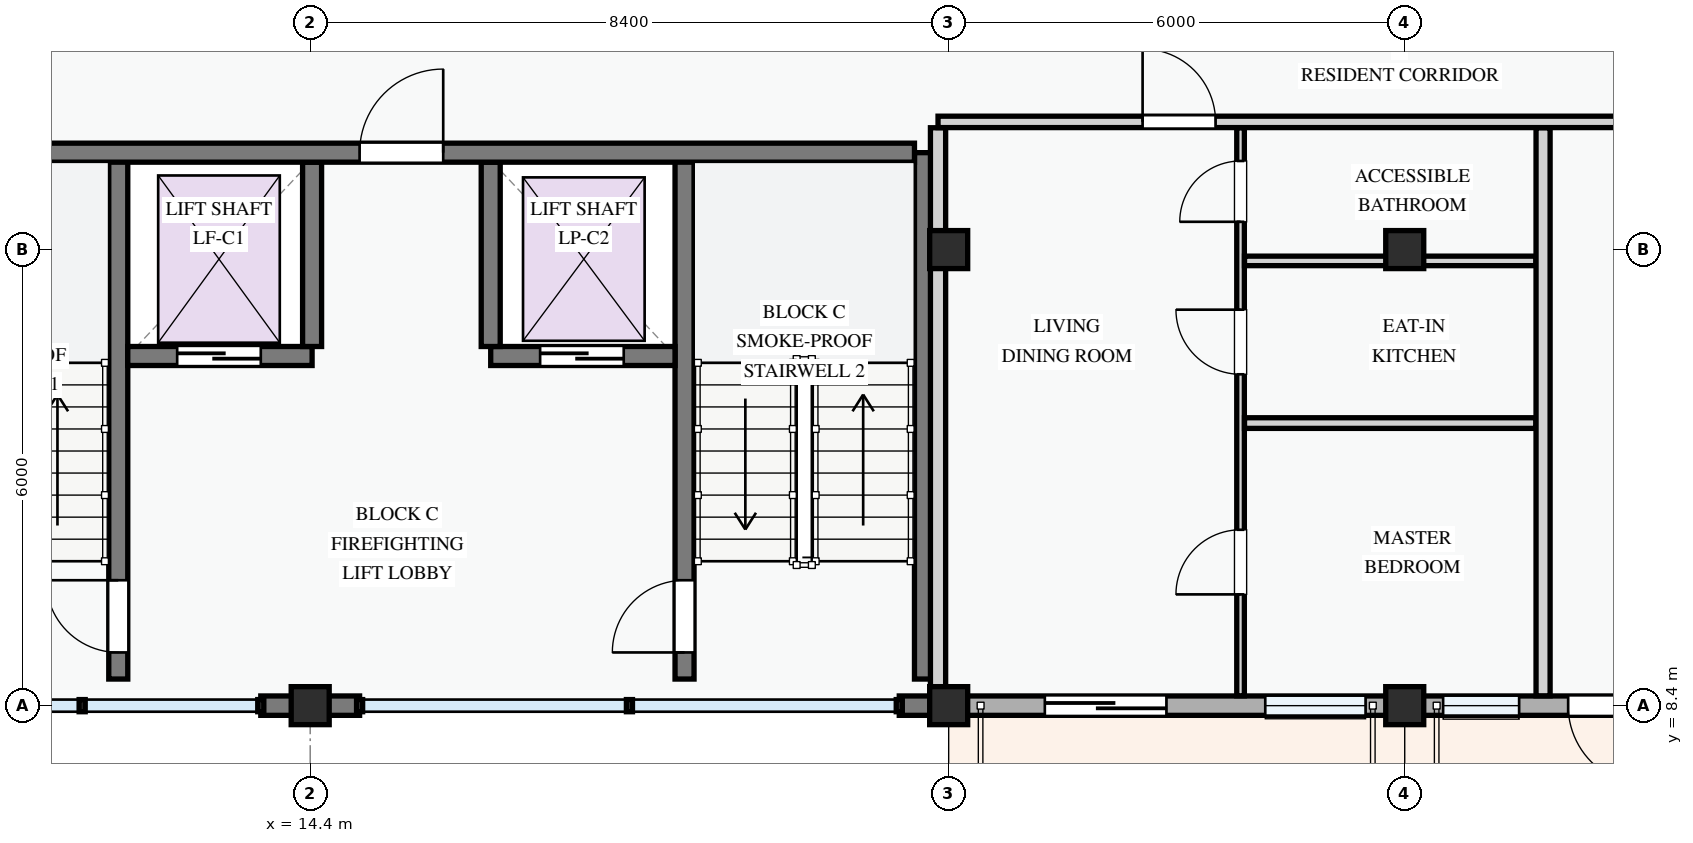
"""IFC4 building model, lengths in metres.
Left out: names, types, materials, properties, quantities, classifications, styles, units other than length and angle.
Written with IfcOpenShell. Run it as: python <this file> out.ifc"""

import sys

from ifc_helpers import new_model, si_unit, direction, frame, frame_2d, origin, origin_2d, place, context, subcontext, project, spatial, rectangle, extrude, element, fill, save


model = new_model("IFC4")
c1 = context("Model", 3, precision=1e-05, world=origin(), true_north=direction((0.0, 1.0)))
c2 = subcontext(c1, "Body", "Model", "MODEL_VIEW")
j1 = project(units=[si_unit("LENGTHUNIT", "METRE"), si_unit("PLANEANGLEUNIT", "RADIAN")], contexts=[c1])
p1 = place(None, origin())
s1 = spatial("IfcSite", under=j1, at=p1, CompositionType="ELEMENT")
p2 = place(p1, origin())
s2 = spatial("IfcBuilding", under=s1, at=p2, CompositionType="ELEMENT")
p3 = place(p2, frame((0.0, 0.0, 31.2)))
s3 = spatial("IfcBuildingStorey", under=s2, at=p3, CompositionType="ELEMENT", Elevation=31.2)
for number, where, z_axis, x_axis in (
    (1, (14.4, 8.4, 0.0), (0.0, 0.0, 1.0), (1.0, 0.0, 0.0)),
    (2, (22.8, 8.4, 0.0), (0.0, 0.0, 1.0), (1.0, 0.0, 0.0)),
    (3, (22.8, 14.4, 0.0), (0.0, 0.0, 1.0), (1.0, 0.0, 0.0)),
    (4, (28.8, 8.4, 0.0), (0.0, 0.0, 1.0), (1.0, 0.0, 0.0)),
    (5, (28.8, 14.4, 0.0), (0.0, 0.0, 1.0), (1.0, 0.0, 0.0)),
):
    element("IfcColumn", number, at=place(p3, frame(where, z_axis=z_axis, x_axis=x_axis)), inside=s3, PredefinedType="COLUMN", context=c2, shape_type="SweptSolid", body=[
        extrude(rectangle(XDim=0.5, YDim=0.5, at=origin_2d()), origin(), (0.0, 0.0, 1.0), 3.3),
    ])
p4 = place(p3, frame((13.75, 8.4, 0.0), z_axis=(0.0, 0.0, 1.0), x_axis=(1.0, 0.0, 0.0)))
e6 = element("IfcWall", 6, at=p4, inside=s3, PredefinedType="STANDARD", context=c2, shape_type="SweptSolid", body=[
    extrude(rectangle(XDim=0.65, YDim=0.255, at=frame_2d((0.325, 0.0))), origin(), (0.0, 0.0, 1.0), 3.04),
])
for number, where, z_axis, x_axis in (
    (7, (14.4, 8.4, 0.0), (0.0, 0.0, 1.0), (1.0, 0.0, 0.0)),
    (8, (22.15, 8.4, 0.0), (0.0, 0.0, 1.0), (1.0, 0.0, 0.0)),
):
    element("IfcWall", number, at=place(p3, frame(where, z_axis=z_axis, x_axis=x_axis)), inside=s3, PredefinedType="STANDARD", context=c2, shape_type="SweptSolid", body=[
        extrude(rectangle(XDim=0.65, YDim=0.255, at=frame_2d((0.325, 0.0))), origin(), (0.0, 0.0, 1.0), 3.04),
    ])
p5 = place(p3, frame((22.8, 8.4, 0.0), z_axis=(0.0, 0.0, 1.0), x_axis=(1.0, 0.0, 0.0)))
e9 = element("IfcWall", 9, at=p5, inside=s3, PredefinedType="STANDARD", context=c2, shape_type="SweptSolid", body=[
    extrude(rectangle(XDim=6.0, YDim=0.255, at=frame_2d((3.0, 0.0))), origin(), (0.0, 0.0, 1.0), 2.525),
])
p6 = place(p5, frame((1.265, 0.0, 0.0)))
e10 = element("IfcOpeningElement", 10, at=p6, cuts=e9, PredefinedType="OPENING", context=c2, shape_type="SweptSolid", body=[
    extrude(rectangle(XDim=1.6, YDim=2.2, at=frame_2d((0.8, 1.1))), frame((0.0, 0.137, 0.0), z_axis=(0.0, -1.0, 0.0), x_axis=(1.0, 0.0, 0.0)), (0.0, 0.0, 1.0), 0.275),
])
p7 = place(p5, frame((4.165, 0.0, 0.78)))
e11 = element("IfcOpeningElement", 11, at=p7, cuts=e9, PredefinedType="OPENING", context=c2, shape_type="SweptSolid", body=[
    extrude(rectangle(XDim=1.32, YDim=1.35, at=frame_2d((0.66, 0.675))), frame((0.0, 0.137, 0.0), z_axis=(0.0, -1.0, 0.0), x_axis=(1.0, 0.0, 0.0)), (0.0, 0.0, 1.0), 0.275),
])
p8 = place(p3, frame((28.8, 8.4, 0.0), z_axis=(0.0, 0.0, 1.0), x_axis=(1.0, 0.0, 0.0)))
e12 = element("IfcWall", 12, at=p8, inside=s3, PredefinedType="STANDARD", context=c2, shape_type="SweptSolid", body=[
    extrude(rectangle(XDim=8.4, YDim=0.255, at=frame_2d((4.2, 0.0))), origin(), (0.0, 0.0, 1.0), 2.375),
])
p9 = place(p8, frame((2.15, 0.0, 0.0)))
e13 = element("IfcOpeningElement", 13, at=p9, cuts=e12, PredefinedType="OPENING", context=c2, shape_type="SweptSolid", body=[
    extrude(rectangle(XDim=1.05, YDim=2.15, at=frame_2d((0.525, 1.075))), frame((0.0, 0.137, 0.0), z_axis=(0.0, -1.0, 0.0), x_axis=(1.0, 0.0, 0.0)), (0.0, 0.0, 1.0), 0.275),
])
p10 = place(p8, frame((0.505, 0.0, 0.78)))
e14 = element("IfcOpeningElement", 14, at=p10, cuts=e12, PredefinedType="OPENING", context=c2, shape_type="SweptSolid", body=[
    extrude(rectangle(XDim=1.0, YDim=1.25, at=frame_2d((0.5, 0.625))), frame((0.0, 0.137, 0.0), z_axis=(0.0, -1.0, 0.0), x_axis=(1.0, 0.0, 0.0)), (0.0, 0.0, 1.0), 0.275),
])
p11 = place(p8, frame((4.265, 0.0, 0.78)))
e15 = element("IfcOpeningElement", 15, at=p11, cuts=e12, PredefinedType="OPENING", context=c2, shape_type="SweptSolid", body=[
    extrude(rectangle(XDim=1.4, YDim=1.45, at=frame_2d((0.7, 0.725))), frame((0.0, 0.137, 0.0), z_axis=(0.0, -1.0, 0.0), x_axis=(1.0, 0.0, 0.0)), (0.0, 0.0, 1.0), 0.275),
])
p12 = place(p8, frame((6.97, 0.0, 0.78)))
e16 = element("IfcOpeningElement", 16, at=p12, cuts=e12, PredefinedType="OPENING", context=c2, shape_type="SweptSolid", body=[
    extrude(rectangle(XDim=0.95, YDim=1.15, at=frame_2d((0.475, 0.575))), frame((0.0, 0.137, 0.0), z_axis=(0.0, -1.0, 0.0), x_axis=(1.0, 0.0, 0.0)), (0.0, 0.0, 1.0), 0.275),
])
p13 = place(p3, frame((11.875, 8.75, 0.0), z_axis=(0.0, 0.0, 1.0), x_axis=(0.0, 1.0, 0.0)))
e17 = element("IfcWall", 17, at=p13, inside=s3, PredefinedType="SHEAR", context=c2, shape_type="SweptSolid", body=[
    extrude(rectangle(XDim=6.925, YDim=0.25, at=frame_2d((3.462, 0.0))), origin(), (0.0, 0.0, 1.0), 3.0),
])
p14 = place(p13, frame((0.35, 0.0, 0.0)))
e18 = element("IfcOpeningElement", 18, at=p14, cuts=e17, PredefinedType="OPENING", context=c2, shape_type="SweptSolid", body=[
    extrude(rectangle(XDim=0.95, YDim=2.1, at=frame_2d((0.475, 1.05))), frame((0.0, 0.135, 0.0), z_axis=(0.0, -1.0, 0.0), x_axis=(1.0, 0.0, 0.0)), (0.0, 0.0, 1.0), 0.27),
])
p15 = place(p3, frame((22.475, 8.75, 0.0), z_axis=(0.0, 0.0, 1.0), x_axis=(0.0, 1.0, 0.0)))
e19 = element("IfcWall", 19, at=p15, inside=s3, PredefinedType="SHEAR", context=c2, shape_type="SweptSolid", body=[
    extrude(rectangle(XDim=6.925, YDim=0.25, at=frame_2d((3.462, 0.0))), origin(), (0.0, 0.0, 1.0), 3.0),
])
p16 = place(p3, frame((19.325, 8.75, 0.0), z_axis=(0.0, 0.0, 1.0), x_axis=(0.0, 1.0, 0.0)))
e20 = element("IfcWall", 20, at=p16, inside=s3, PredefinedType="SHEAR", context=c2, shape_type="SweptSolid", body=[
    extrude(rectangle(XDim=6.925, YDim=0.25, at=frame_2d((3.462, 0.0))), origin(), (0.0, 0.0, 1.0), 3.0),
])
p17 = place(p16, frame((0.35, 0.0, 0.0)))
e21 = element("IfcOpeningElement", 21, at=p17, cuts=e20, PredefinedType="OPENING", context=c2, shape_type="SweptSolid", body=[
    extrude(rectangle(XDim=0.95, YDim=2.1, at=frame_2d((0.475, 1.05))), frame((0.0, 0.135, 0.0), z_axis=(0.0, -1.0, 0.0), x_axis=(1.0, 0.0, 0.0)), (0.0, 0.0, 1.0), 0.27),
])
p18 = place(p3, frame((12.0, 13.0, 0.0), z_axis=(0.0, 0.0, 1.0), x_axis=(1.0, 0.0, 0.0)))
e22 = element("IfcWall", 22, at=p18, inside=s3, PredefinedType="SHEAR", context=c2, shape_type="SweptSolid", body=[
    extrude(rectangle(XDim=2.425, YDim=0.25, at=frame_2d((1.212, 0.0))), origin(), (0.0, 0.0, 1.0), 3.0),
])
p19 = place(p18, frame((0.65, 0.0, 0.0)))
e23 = element("IfcOpeningElement", 23, at=p19, cuts=e22, PredefinedType="OPENING", context=c2, shape_type="SweptSolid", body=[
    extrude(rectangle(XDim=1.1, YDim=2.15, at=frame_2d((0.55, 1.075))), frame((0.0, 0.135, 0.0), z_axis=(0.0, -1.0, 0.0), x_axis=(1.0, 0.0, 0.0)), (0.0, 0.0, 1.0), 0.27),
])
p20 = place(p3, frame((16.775, 13.0, 0.0), z_axis=(0.0, 0.0, 1.0), x_axis=(1.0, 0.0, 0.0)))
e24 = element("IfcWall", 24, at=p20, inside=s3, PredefinedType="SHEAR", context=c2, shape_type="SweptSolid", body=[
    extrude(rectangle(XDim=2.425, YDim=0.25, at=frame_2d((1.212, 0.0))), origin(), (0.0, 0.0, 1.0), 3.0),
])
p21 = place(p20, frame((0.65, 0.0, 0.0)))
e25 = element("IfcOpeningElement", 25, at=p21, cuts=e24, PredefinedType="OPENING", context=c2, shape_type="SweptSolid", body=[
    extrude(rectangle(XDim=1.1, YDim=2.15, at=frame_2d((0.55, 1.075))), frame((0.0, 0.135, 0.0), z_axis=(0.0, -1.0, 0.0), x_axis=(1.0, 0.0, 0.0)), (0.0, 0.0, 1.0), 0.27),
])
for number, where, z_axis, x_axis in (
    (26, (14.425, 13.125, 0.0), (0.0, 0.0, 1.0), (0.0, 1.0, 0.0)),
    (27, (16.775, 13.125, 0.0), (0.0, 0.0, 1.0), (0.0, 1.0, 0.0)),
):
    element("IfcWall", number, at=place(p3, frame(where, z_axis=z_axis, x_axis=x_axis)), inside=s3, PredefinedType="SHEAR", context=c2, shape_type="SweptSolid", body=[
        extrude(rectangle(XDim=2.425, YDim=0.25, at=frame_2d((1.212, 0.0))), origin(), (0.0, 0.0, 1.0), 3.0),
    ])
p22 = place(p3, frame((8.85, 15.675, 0.0), z_axis=(0.0, 0.0, 1.0), x_axis=(1.0, 0.0, 0.0)))
e28 = element("IfcWall", 28, at=p22, inside=s3, PredefinedType="SHEAR", context=c2, shape_type="SweptSolid", body=[
    extrude(rectangle(XDim=13.5, YDim=0.25, at=frame_2d((6.75, 0.0))), origin(), (0.0, 0.0, 1.0), 3.0),
])
p23 = place(p22, frame((6.2, 0.0, 0.0)))
e29 = element("IfcOpeningElement", 29, at=p23, cuts=e28, PredefinedType="OPENING", context=c2, shape_type="SweptSolid", body=[
    extrude(rectangle(XDim=1.1, YDim=2.15, at=frame_2d((0.55, 1.075))), frame((0.0, 0.135, 0.0), z_axis=(0.0, -1.0, 0.0), x_axis=(1.0, 0.0, 0.0)), (0.0, 0.0, 1.0), 0.27),
])
p24 = place(p3, frame((26.64, 8.53, 0.0), z_axis=(0.0, 0.0, 1.0), x_axis=(0.0, 1.0, 0.0)))
e30 = element("IfcWall", 30, at=p24, inside=s3, PredefinedType="PARTITIONING", context=c2, shape_type="SweptSolid", body=[
    extrude(rectangle(XDim=7.473, YDim=0.1, at=frame_2d((3.737, 0.0))), origin(), (0.0, 0.0, 1.0), 3.0),
])
p25 = place(p24, frame((1.334, 0.0, 0.0)))
e31 = element("IfcOpeningElement", 31, at=p25, cuts=e30, PredefinedType="OPENING", context=c2, shape_type="SweptSolid", body=[
    extrude(rectangle(XDim=0.85, YDim=2.1, at=frame_2d((0.425, 1.05))), frame((0.0, 0.06, 0.0), z_axis=(0.0, -1.0, 0.0), x_axis=(1.0, 0.0, 0.0)), (0.0, 0.0, 1.0), 0.12),
])
p26 = place(p24, frame((4.23, 0.0, 0.0)))
e32 = element("IfcOpeningElement", 32, at=p26, cuts=e30, PredefinedType="OPENING", context=c2, shape_type="SweptSolid", body=[
    extrude(rectangle(XDim=0.85, YDim=2.1, at=frame_2d((0.425, 1.05))), frame((0.0, 0.06, 0.0), z_axis=(0.0, -1.0, 0.0), x_axis=(1.0, 0.0, 0.0)), (0.0, 0.0, 1.0), 0.12),
])
p27 = place(p24, frame((6.236, 0.0, 0.0)))
e33 = element("IfcOpeningElement", 33, at=p27, cuts=e30, PredefinedType="OPENING", context=c2, shape_type="SweptSolid", body=[
    extrude(rectangle(XDim=0.8, YDim=2.1, at=frame_2d((0.4, 1.05))), frame((0.0, 0.06, 0.0), z_axis=(0.0, -1.0, 0.0), x_axis=(1.0, 0.0, 0.0)), (0.0, 0.0, 1.0), 0.12),
])
p28 = place(p3, frame((26.692, 12.118, 0.0), z_axis=(0.0, 0.0, 1.0), x_axis=(1.0, 0.0, 0.0)))
e34 = element("IfcWall", 34, at=p28, inside=s3, PredefinedType="PARTITIONING", context=c2, shape_type="SweptSolid", body=[
    extrude(rectangle(XDim=3.833, YDim=0.14, at=frame_2d((1.917, 0.0))), origin(), (0.0, 0.0, 1.0), 3.0),
])
p29 = place(p3, frame((26.692, 14.251, 0.0), z_axis=(0.0, 0.0, 1.0), x_axis=(1.0, 0.0, 0.0)))
e35 = element("IfcWall", 35, at=p29, inside=s3, PredefinedType="PARTITIONING", context=c2, shape_type="SweptSolid", body=[
    extrude(rectangle(XDim=3.833, YDim=0.125, at=frame_2d((1.917, 0.0))), origin(), (0.0, 0.0, 1.0), 2.375),
])
p30 = place(p3, frame((22.66, 8.53, 0.0), z_axis=(0.0, 0.0, 1.0), x_axis=(0.0, 1.0, 0.0)))
e36 = element("IfcWall", 36, at=p30, inside=s3, PredefinedType="PARTITIONING", context=c2, shape_type="SweptSolid", body=[
    extrude(rectangle(XDim=7.473, YDim=0.2, at=frame_2d((3.737, 0.0))), origin(), (0.0, 0.0, 1.0), 2.425),
])
p31 = place(p3, frame((30.62, 8.53, 0.0), z_axis=(0.0, 0.0, 1.0), x_axis=(0.0, 1.0, 0.0)))
e37 = element("IfcWall", 37, at=p31, inside=s3, PredefinedType="PARTITIONING", context=c2, shape_type="SweptSolid", body=[
    extrude(rectangle(XDim=7.473, YDim=0.185, at=frame_2d((3.737, 0.0))), origin(), (0.0, 0.0, 1.0), 3.0),
])
p32 = place(p3, frame((22.66, 16.08, 0.0), z_axis=(0.0, 0.0, 1.0), x_axis=(1.0, 0.0, 0.0)))
e38 = element("IfcWall", 38, at=p32, inside=s3, PredefinedType="PARTITIONING", context=c2, shape_type="SweptSolid", body=[
    extrude(rectangle(XDim=20.48, YDim=0.15, at=frame_2d((10.24, 0.0))), origin(), (0.0, 0.0, 1.0), 3.0),
])
p33 = place(p32, frame((2.691, 0.0, 0.0)))
e39 = element("IfcOpeningElement", 39, at=p33, cuts=e38, PredefinedType="OPENING", context=c2, shape_type="SweptSolid", body=[
    extrude(rectangle(XDim=0.96, YDim=2.12, at=frame_2d((0.48, 1.06))), frame((0.0, 0.085, 0.0), z_axis=(0.0, -1.0, 0.0), x_axis=(1.0, 0.0, 0.0)), (0.0, 0.0, 1.0), 0.17),
])
p34 = place(p32, frame((9.91, 0.0, 0.0)))
e40 = element("IfcOpeningElement", 40, at=p34, cuts=e38, PredefinedType="OPENING", context=c2, shape_type="SweptSolid", body=[
    extrude(rectangle(XDim=0.92, YDim=2.1, at=frame_2d((0.46, 1.05))), frame((0.0, 0.085, 0.0), z_axis=(0.0, -1.0, 0.0), x_axis=(1.0, 0.0, 0.0)), (0.0, 0.0, 1.0), 0.17),
])
p35 = place(p6, frame((1.6, 0.0, 0.0), z_axis=(0.0, 0.0, 1.0), x_axis=(-1.0, 0.0, 0.0)))
e41 = element("IfcDoor", 41, at=p35, inside=s3, OperationType="SLIDING_TO_LEFT", PredefinedType="DOOR", context=c2, shape_type="SweptSolid", body=[
    extrude(rectangle(XDim=1.6, YDim=2.2, at=frame_2d((0.8, 1.1))), frame((0.0, 0.025, 0.0), z_axis=(0.0, -1.0, 0.0), x_axis=(1.0, 0.0, 0.0)), (0.0, 0.0, 1.0), 0.05),
])
fill(e10, e41)
p36 = place(p7, origin())
e42 = element("IfcWindow", 42, at=p36, inside=s3, PartitioningType="SINGLE_PANEL", PredefinedType="WINDOW", context=c2, shape_type="SweptSolid", body=[
    extrude(rectangle(XDim=1.32, YDim=1.35, at=frame_2d((0.66, 0.675))), frame((0.0, 0.03, 0.0), z_axis=(0.0, -1.0, 0.0), x_axis=(1.0, 0.0, 0.0)), (0.0, 0.0, 1.0), 0.06),
])
fill(e11, e42)
p37 = place(p9, frame((1.05, 0.0, 0.0), z_axis=(0.0, 0.0, 1.0), x_axis=(-1.0, 0.0, 0.0)))
e43 = element("IfcDoor", 43, at=p37, inside=s3, OperationType="SINGLE_SWING_LEFT", PredefinedType="DOOR", context=c2, shape_type="SweptSolid", body=[
    extrude(rectangle(XDim=1.05, YDim=2.15, at=frame_2d((0.525, 1.075))), frame((0.0, 0.025, 0.0), z_axis=(0.0, -1.0, 0.0), x_axis=(1.0, 0.0, 0.0)), (0.0, 0.0, 1.0), 0.05),
])
fill(e13, e43)
p38 = place(p10, origin())
e44 = element("IfcWindow", 44, at=p38, inside=s3, PartitioningType="SINGLE_PANEL", PredefinedType="WINDOW", context=c2, shape_type="SweptSolid", body=[
    extrude(rectangle(XDim=1.0, YDim=1.25, at=frame_2d((0.5, 0.625))), frame((0.0, 0.03, 0.0), z_axis=(0.0, -1.0, 0.0), x_axis=(1.0, 0.0, 0.0)), (0.0, 0.0, 1.0), 0.06),
])
fill(e14, e44)
p39 = place(p14, origin())
e45 = element("IfcDoor", 45, at=p39, inside=s3, OperationType="SINGLE_SWING_RIGHT", PredefinedType="DOOR", context=c2, shape_type="SweptSolid", body=[
    extrude(rectangle(XDim=0.95, YDim=2.1, at=frame_2d((0.475, 1.05))), frame((0.0, 0.025, 0.0), z_axis=(0.0, -1.0, 0.0), x_axis=(1.0, 0.0, 0.0)), (0.0, 0.0, 1.0), 0.05),
])
fill(e18, e45)
p40 = place(p17, origin())
e46 = element("IfcDoor", 46, at=p40, inside=s3, OperationType="SINGLE_SWING_LEFT", PredefinedType="DOOR", context=c2, shape_type="SweptSolid", body=[
    extrude(rectangle(XDim=0.95, YDim=2.1, at=frame_2d((0.475, 1.05))), frame((0.0, 0.025, 0.0), z_axis=(0.0, -1.0, 0.0), x_axis=(1.0, 0.0, 0.0)), (0.0, 0.0, 1.0), 0.05),
])
fill(e21, e46)
p41 = place(p19, origin())
e47 = element("IfcDoor", 47, at=p41, inside=s3, OperationType="SLIDING_TO_LEFT", PredefinedType="DOOR", context=c2, shape_type="SweptSolid", body=[
    extrude(rectangle(XDim=1.1, YDim=2.15, at=frame_2d((0.55, 1.075))), frame((0.0, 0.025, 0.0), z_axis=(0.0, -1.0, 0.0), x_axis=(1.0, 0.0, 0.0)), (0.0, 0.0, 1.0), 0.05),
])
fill(e23, e47)
p42 = place(p21, origin())
e48 = element("IfcDoor", 48, at=p42, inside=s3, OperationType="SLIDING_TO_LEFT", PredefinedType="DOOR", context=c2, shape_type="SweptSolid", body=[
    extrude(rectangle(XDim=1.1, YDim=2.15, at=frame_2d((0.55, 1.075))), frame((0.0, 0.025, 0.0), z_axis=(0.0, -1.0, 0.0), x_axis=(1.0, 0.0, 0.0)), (0.0, 0.0, 1.0), 0.05),
])
fill(e25, e48)
p43 = place(p23, origin())
e49 = element("IfcDoor", 49, at=p43, inside=s3, OperationType="SINGLE_SWING_RIGHT", PredefinedType="DOOR", context=c2, shape_type="SweptSolid", body=[
    extrude(rectangle(XDim=1.1, YDim=2.15, at=frame_2d((0.55, 1.075))), frame((0.0, 0.025, 0.0), z_axis=(0.0, -1.0, 0.0), x_axis=(1.0, 0.0, 0.0)), (0.0, 0.0, 1.0), 0.05),
])
fill(e29, e49)
p44 = place(p25, origin())
e50 = element("IfcDoor", 50, at=p44, inside=s3, OperationType="SINGLE_SWING_LEFT", PredefinedType="DOOR", context=c2, shape_type="SweptSolid", body=[
    extrude(rectangle(XDim=0.85, YDim=2.1, at=frame_2d((0.425, 1.05))), frame((0.0, 0.025, 0.0), z_axis=(0.0, -1.0, 0.0), x_axis=(1.0, 0.0, 0.0)), (0.0, 0.0, 1.0), 0.05),
])
fill(e31, e50)
p45 = place(p26, origin())
e51 = element("IfcDoor", 51, at=p45, inside=s3, OperationType="SINGLE_SWING_RIGHT", PredefinedType="DOOR", context=c2, shape_type="SweptSolid", body=[
    extrude(rectangle(XDim=0.85, YDim=2.1, at=frame_2d((0.425, 1.05))), frame((0.0, 0.025, 0.0), z_axis=(0.0, -1.0, 0.0), x_axis=(1.0, 0.0, 0.0)), (0.0, 0.0, 1.0), 0.05),
])
fill(e32, e51)
p46 = place(p27, origin())
e52 = element("IfcDoor", 52, at=p46, inside=s3, OperationType="SINGLE_SWING_LEFT", PredefinedType="DOOR", context=c2, shape_type="SweptSolid", body=[
    extrude(rectangle(XDim=0.8, YDim=2.1, at=frame_2d((0.4, 1.05))), frame((0.0, 0.025, 0.0), z_axis=(0.0, -1.0, 0.0), x_axis=(1.0, 0.0, 0.0)), (0.0, 0.0, 1.0), 0.05),
])
fill(e33, e52)
p47 = place(p33, origin())
e53 = element("IfcDoor", 53, at=p47, inside=s3, OperationType="SINGLE_SWING_LEFT", PredefinedType="DOOR", context=c2, shape_type="SweptSolid", body=[
    extrude(rectangle(XDim=0.96, YDim=2.12, at=frame_2d((0.48, 1.06))), frame((0.0, 0.025, 0.0), z_axis=(0.0, -1.0, 0.0), x_axis=(1.0, 0.0, 0.0)), (0.0, 0.0, 1.0), 0.05),
])
fill(e39, e53)
save(model, sys.argv[1])
